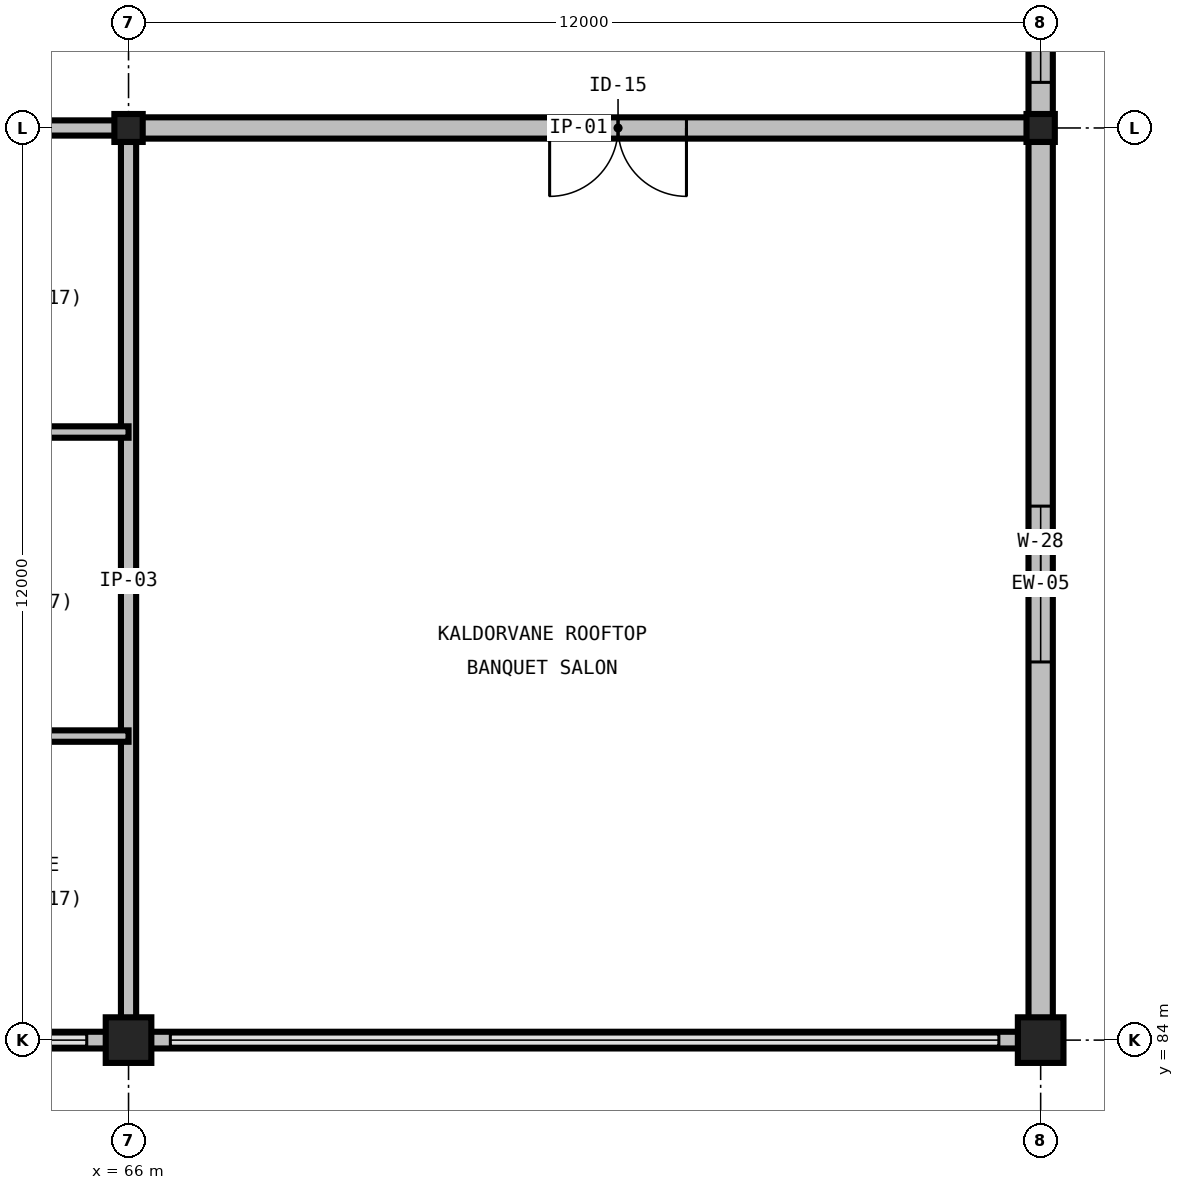
"""IFC4 building model, lengths in metres.
Left out: names, types, materials, properties, quantities, classifications, styles, units other than length and angle.
Written with IfcOpenShell. Run it as: python <this file> out.ifc"""

import sys

from ifc_helpers import new_model, si_unit, direction, frame, frame_2d, origin, origin_2d, place, context, subcontext, project, spatial, rectangle, i_section, extrude, element, fill, save


model = new_model("IFC4")
c1 = context("Model", 3, precision=1e-05, world=origin(), true_north=direction((0.0, 1.0)))
c2 = subcontext(c1, "Body", "Model", "MODEL_VIEW")
j1 = project(units=[si_unit("LENGTHUNIT", "METRE"), si_unit("PLANEANGLEUNIT", "RADIAN")], contexts=[c1])
p1 = place(None, origin())
s1 = spatial("IfcSite", under=j1, at=p1, CompositionType="ELEMENT")
p2 = place(p1, origin())
s2 = spatial("IfcBuilding", under=s1, at=p2, CompositionType="ELEMENT")
p3 = place(p2, frame((0.0, 0.0, 70.8)))
s3 = spatial("IfcBuildingStorey", under=s2, at=p3, CompositionType="ELEMENT", Elevation=70.8)
p4 = place(p3, frame((66.0, 84.0, 0.0), z_axis=(0.0, 0.0, 1.0), x_axis=(1.0, 0.0, 0.0)))
e1 = element("IfcColumn", 1, at=p4, inside=s3, PredefinedType="COLUMN", context=c2, shape_type="SweptSolid", body=[
    extrude(rectangle(XDim=0.6, YDim=0.6, at=origin_2d()), origin(), (0.0, 0.0, 1.0), 4.8),
])
p5 = place(p3, frame((66.0, 96.0, 0.0), z_axis=(0.0, 0.0, 1.0), x_axis=(1.0, 0.0, 0.0)))
e2 = element("IfcColumn", 2, at=p5, inside=s3, PredefinedType="COLUMN", context=c2, shape_type="SweptSolid", body=[
    extrude(i_section(OverallWidth=0.373, OverallDepth=0.368, WebThickness=0.015, FlangeThickness=0.024, FilletRadius=0.031, at=origin_2d()), origin(), (0.0, 0.0, 1.0), 4.8),
])
p6 = place(p3, frame((78.0, 84.0, 0.0), z_axis=(0.0, 0.0, 1.0), x_axis=(1.0, 0.0, 0.0)))
e3 = element("IfcColumn", 3, at=p6, inside=s3, PredefinedType="COLUMN", context=c2, shape_type="SweptSolid", body=[
    extrude(rectangle(XDim=0.6, YDim=0.6, at=origin_2d()), origin(), (0.0, 0.0, 1.0), 4.8),
])
p7 = place(p3, frame((78.0, 96.0, 0.0), z_axis=(0.0, 0.0, 1.0), x_axis=(1.0, 0.0, 0.0)))
e4 = element("IfcColumn", 4, at=p7, inside=s3, PredefinedType="COLUMN", context=c2, shape_type="SweptSolid", body=[
    extrude(i_section(OverallWidth=0.373, OverallDepth=0.368, WebThickness=0.015, FlangeThickness=0.024, FilletRadius=0.031, at=origin_2d()), origin(), (0.0, 0.0, 1.0), 4.8),
])
for number, where, z_axis, x_axis in (
    (5, (54.0, 84.0, 0.0), (0.0, 0.0, 1.0), (1.0, 0.0, 0.0)),
    (6, (66.0, 84.0, 0.0), (0.0, 0.0, 1.0), (1.0, 0.0, 0.0)),
):
    element("IfcWall", number, at=place(p3, frame(where, z_axis=z_axis, x_axis=x_axis)), inside=s3, PredefinedType="PARAPET", context=c2, shape_type="SweptSolid", body=[
        extrude(rectangle(XDim=12.0, YDim=0.22, at=frame_2d((6.0, 0.0))), origin(), (0.0, 0.0, 1.0), 0.2),
    ])
p8 = place(p3, frame((78.0, 84.0, 0.0), z_axis=(0.0, 0.0, 1.0), x_axis=(0.0, 1.0, 0.0)))
e7 = element("IfcWall", 7, at=p8, inside=s3, PredefinedType="STANDARD", context=c2, shape_type="SweptSolid", body=[
    extrude(rectangle(XDim=12.0, YDim=0.32, at=frame_2d((6.0, 0.0))), origin(), (0.0, 0.0, 1.0), 4.171),
])
p9 = place(p8, frame((4.975, 0.0, 0.85)))
e8 = element("IfcOpeningElement", 8, at=p9, cuts=e7, PredefinedType="OPENING", context=c2, shape_type="SweptSolid", body=[
    extrude(rectangle(XDim=2.05, YDim=2.1, at=frame_2d((1.025, 1.05))), frame((0.0, 0.175, 0.0), z_axis=(0.0, -1.0, 0.0), x_axis=(1.0, 0.0, 0.0)), (0.0, 0.0, 1.0), 0.35),
])
p10 = place(p3, frame((78.0, 96.0, 0.0), z_axis=(0.0, 0.0, 1.0), x_axis=(0.0, 1.0, 0.0)))
e9 = element("IfcWall", 9, at=p10, inside=s3, PredefinedType="STANDARD", context=c2, shape_type="SweptSolid", body=[
    extrude(rectangle(XDim=9.0, YDim=0.32, at=frame_2d((4.5, 0.0))), origin(), (0.0, 0.0, 1.0), 4.171),
])
p11 = place(p10, frame((0.6, 0.0, 0.85)))
e10 = element("IfcOpeningElement", 10, at=p11, cuts=e9, PredefinedType="OPENING", context=c2, shape_type="SweptSolid", body=[
    extrude(rectangle(XDim=2.05, YDim=2.1, at=frame_2d((1.025, 1.05))), frame((0.0, 0.175, 0.0), z_axis=(0.0, -1.0, 0.0), x_axis=(1.0, 0.0, 0.0)), (0.0, 0.0, 1.0), 0.35),
])
p12 = place(p3, frame((36.0, 84.14, 4.8), z_axis=(0.0, 0.0, 1.0), x_axis=(1.0, 0.0, 0.0)))
e11 = element("IfcWall", 11, at=p12, inside=s3, PredefinedType="PARAPET", context=c2, shape_type="SweptSolid", body=[
    extrude(rectangle(XDim=42.0, YDim=0.28, at=frame_2d((21.0, 0.0))), origin(), (0.0, 0.0, 1.0), 1.2),
])
p13 = place(p3, frame((77.86, 84.28, 4.8), z_axis=(0.0, 0.0, 1.0), x_axis=(0.0, 1.0, 0.0)))
e12 = element("IfcWall", 12, at=p13, inside=s3, PredefinedType="PARAPET", context=c2, shape_type="SweptSolid", body=[
    extrude(rectangle(XDim=32.44, YDim=0.28, at=frame_2d((16.22, 0.0))), origin(), (0.0, 0.0, 1.0), 1.2),
])
p14 = place(p3, frame((66.0, 84.085, 0.0), z_axis=(0.0, 0.0, 1.0), x_axis=(0.0, 1.0, 0.0)))
e13 = element("IfcWall", 13, at=p14, inside=s3, PredefinedType="PARTITIONING", context=c2, shape_type="SweptSolid", body=[
    extrude(rectangle(XDim=11.915, YDim=0.2, at=frame_2d((5.957, 0.0))), origin(), (0.0, 0.0, 1.0), 3.78),
])
p15 = place(p3, frame((60.8, 96.0, 0.0), z_axis=(0.0, 0.0, 1.0), x_axis=(1.0, 0.0, 0.0)))
e14 = element("IfcWall", 14, at=p15, inside=s3, PredefinedType="PARTITIONING", context=c2, shape_type="SweptSolid", body=[
    extrude(rectangle(XDim=5.2, YDim=0.2, at=frame_2d((2.6, 0.0))), origin(), (0.0, 0.0, 1.0), 3.549),
])
for number, where, z_axis, x_axis in (
    (15, (60.8, 88.0, 0.0), (0.0, 0.0, 1.0), (1.0, 0.0, 0.0)),
    (16, (60.8, 92.0, 0.0), (0.0, 0.0, 1.0), (1.0, 0.0, 0.0)),
):
    element("IfcWall", number, at=place(p3, frame(where, z_axis=z_axis, x_axis=x_axis)), inside=s3, PredefinedType="PARTITIONING", context=c2, shape_type="SweptSolid", body=[
        extrude(rectangle(XDim=5.2, YDim=0.15, at=frame_2d((2.6, 0.0))), origin(), (0.0, 0.0, 1.0), 4.48),
    ])
p16 = place(p3, frame((77.84, 96.0, 0.0), z_axis=(0.0, 0.0, 1.0), x_axis=(-1.0, 0.0, 0.0)))
e17 = element("IfcWall", 17, at=p16, inside=s3, PredefinedType="PARTITIONING", context=c2, shape_type="SweptSolid", body=[
    extrude(rectangle(XDim=11.84, YDim=0.28, at=frame_2d((5.92, 0.0))), origin(), (0.0, 0.0, 1.0), 3.854),
])
p17 = place(p16, frame((4.5, 0.0, 0.0)))
e18 = element("IfcOpeningElement", 18, at=p17, cuts=e17, PredefinedType="OPENING", context=c2, shape_type="SweptSolid", body=[
    extrude(rectangle(XDim=1.8, YDim=2.3, at=frame_2d((0.9, 1.15))), frame((0.0, 0.155, 0.0), z_axis=(0.0, -1.0, 0.0), x_axis=(1.0, 0.0, 0.0)), (0.0, 0.0, 1.0), 0.31),
])
p18 = place(p9, origin())
e19 = element("IfcWindow", 19, at=p18, inside=s3, PartitioningType="DOUBLE_PANEL_VERTICAL", PredefinedType="WINDOW", context=c2, shape_type="SweptSolid", body=[
    extrude(rectangle(XDim=2.05, YDim=2.1, at=frame_2d((1.025, 1.05))), frame((0.0, 0.03, 0.0), z_axis=(0.0, -1.0, 0.0), x_axis=(1.0, 0.0, 0.0)), (0.0, 0.0, 1.0), 0.06),
])
fill(e8, e19)
p19 = place(p11, origin())
e20 = element("IfcWindow", 20, at=p19, inside=s3, PartitioningType="DOUBLE_PANEL_VERTICAL", PredefinedType="WINDOW", context=c2, shape_type="SweptSolid", body=[
    extrude(rectangle(XDim=2.05, YDim=2.1, at=frame_2d((1.025, 1.05))), frame((0.0, 0.03, 0.0), z_axis=(0.0, -1.0, 0.0), x_axis=(1.0, 0.0, 0.0)), (0.0, 0.0, 1.0), 0.06),
])
fill(e10, e20)
p20 = place(p17, origin())
e21 = element("IfcDoor", 21, at=p20, inside=s3, OperationType="DOUBLE_DOOR_SINGLE_SWING", PredefinedType="DOOR", context=c2, shape_type="SweptSolid", body=[
    extrude(rectangle(XDim=1.8, YDim=2.3, at=frame_2d((0.9, 1.15))), frame((0.0, 0.025, 0.0), z_axis=(0.0, -1.0, 0.0), x_axis=(1.0, 0.0, 0.0)), (0.0, 0.0, 1.0), 0.05),
])
fill(e18, e21)
save(model, sys.argv[1])
